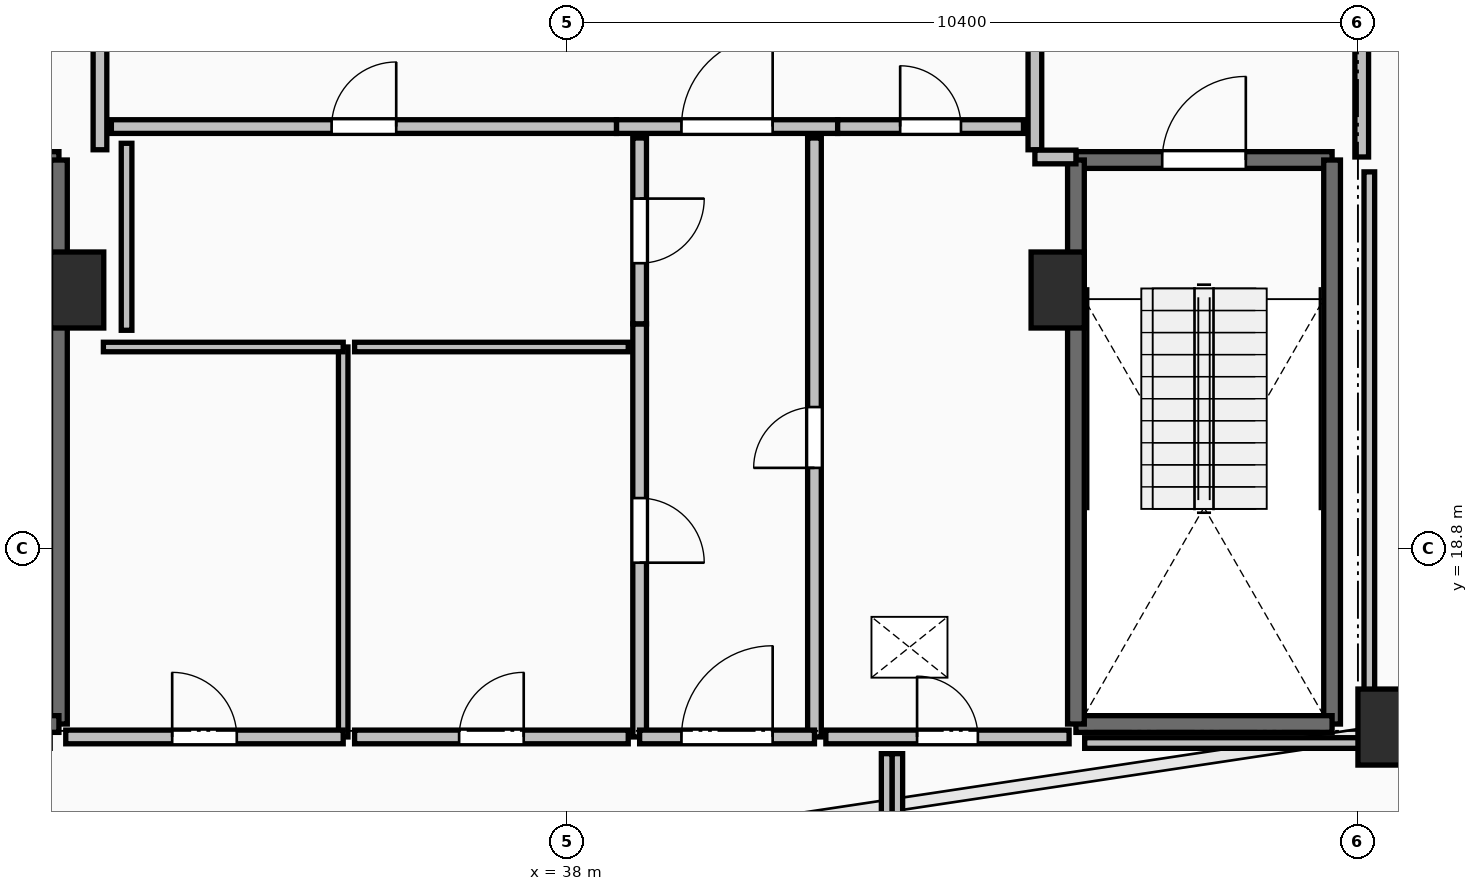
"""IFC4 building model, lengths in metres.
Left out: names, types, materials, properties, quantities, classifications, styles, units other than length and angle.
Written with IfcOpenShell. Run it as: python <this file> out.ifc"""

import sys

from ifc_helpers import new_model, si_unit, direction, frame, frame_2d, origin, origin_2d, place, context, subcontext, project, spatial, rectangle, extrude, element, fill, save


model = new_model("IFC4")
c1 = context("Model", 3, precision=1e-05, world=origin(), true_north=direction((0.0, 1.0)))
c2 = subcontext(c1, "Body", "Model", "MODEL_VIEW")
j1 = project(units=[si_unit("LENGTHUNIT", "METRE"), si_unit("PLANEANGLEUNIT", "RADIAN")], contexts=[c1])
p1 = place(None, origin())
s1 = spatial("IfcSite", under=j1, at=p1, CompositionType="ELEMENT")
p2 = place(p1, origin())
s2 = spatial("IfcBuilding", under=s1, at=p2, CompositionType="ELEMENT")
p3 = place(p2, frame((0.0, 0.0, 234.25)))
s3 = spatial("IfcBuildingStorey", under=s2, at=p3, CompositionType="ELEMENT", Elevation=234.25)
for number, where, z_axis, x_axis in (
    (1, (31.55, 22.2, 0.0), (0.0, 0.0, 1.0), (1.0, 0.0, 0.0)),
    (2, (48.75, 16.45, 0.0), (0.0, 0.0, 1.0), (1.0, 0.0, 0.0)),
    (3, (44.45, 22.2, 0.0), (0.0, 0.0, 1.0), (1.0, 0.0, 0.0)),
):
    element("IfcColumn", number, at=place(p3, frame(where, z_axis=z_axis, x_axis=x_axis)), inside=s3, PredefinedType="PILASTER", context=c2, shape_type="SweptSolid", body=[
        extrude(rectangle(XDim=0.7, YDim=1.0, at=origin_2d()), origin(), (0.0, 0.0, 1.0), 3.55),
    ])
p4 = place(p3, frame((27.94, 23.91, 0.0), z_axis=(0.0, 0.0, 1.0), x_axis=(1.0, 0.0, 0.0)))
e4 = element("IfcWall", 4, at=p4, inside=s3, PredefinedType="SOLIDWALL", context=c2, shape_type="SweptSolid", body=[
    extrude(rectangle(XDim=3.37, YDim=0.22, at=frame_2d((1.685, 0.0))), origin(), (0.0, 0.0, 1.0), 3.29),
])
p5 = place(p4, frame((1.135, 0.0, 0.0)))
e5 = element("IfcOpeningElement", 5, at=p5, cuts=e4, PredefinedType="OPENING", context=c2, shape_type="SweptSolid", body=[
    extrude(rectangle(XDim=1.1, YDim=2.15, at=frame_2d((0.55, 1.075))), frame((0.0, 0.125, 0.0), z_axis=(0.0, -1.0, 0.0), x_axis=(1.0, 0.0, 0.0)), (0.0, 0.0, 1.0), 0.25),
])
p6 = place(p3, frame((31.31, 23.91, 0.0), z_axis=(0.0, 0.0, 1.0), x_axis=(0.0, -1.0, 0.0)))
e6 = element("IfcWall", 6, at=p6, inside=s3, PredefinedType="SOLIDWALL", context=c2, shape_type="SweptSolid", body=[
    extrude(rectangle(XDim=7.42, YDim=0.22, at=frame_2d((3.71, 0.0))), origin(), (0.0, 0.0, 1.0), 3.29),
])
p7 = place(p3, frame((31.31, 16.49, 0.0), z_axis=(0.0, 0.0, 1.0), x_axis=(-1.0, 0.0, 0.0)))
e7 = element("IfcWall", 7, at=p7, inside=s3, PredefinedType="SOLIDWALL", context=c2, shape_type="SweptSolid", body=[
    extrude(rectangle(XDim=3.37, YDim=0.22, at=frame_2d((1.685, 0.0))), origin(), (0.0, 0.0, 1.0), 3.29),
])
p8 = place(p3, frame((44.69, 23.91, 0.0), z_axis=(0.0, 0.0, 1.0), x_axis=(1.0, 0.0, 0.0)))
e8 = element("IfcWall", 8, at=p8, inside=s3, PredefinedType="SOLIDWALL", context=c2, shape_type="SweptSolid", body=[
    extrude(rectangle(XDim=3.37, YDim=0.22, at=frame_2d((1.685, 0.0))), origin(), (0.0, 0.0, 1.0), 3.29),
])
p9 = place(p8, frame((1.135, 0.0, 0.0)))
e9 = element("IfcOpeningElement", 9, at=p9, cuts=e8, PredefinedType="OPENING", context=c2, shape_type="SweptSolid", body=[
    extrude(rectangle(XDim=1.1, YDim=2.15, at=frame_2d((0.55, 1.075))), frame((0.0, 0.125, 0.0), z_axis=(0.0, -1.0, 0.0), x_axis=(1.0, 0.0, 0.0)), (0.0, 0.0, 1.0), 0.25),
])
p10 = place(p3, frame((48.06, 23.91, 0.0), z_axis=(0.0, 0.0, 1.0), x_axis=(0.0, -1.0, 0.0)))
e10 = element("IfcWall", 10, at=p10, inside=s3, PredefinedType="SOLIDWALL", context=c2, shape_type="SweptSolid", body=[
    extrude(rectangle(XDim=7.42, YDim=0.22, at=frame_2d((3.71, 0.0))), origin(), (0.0, 0.0, 1.0), 3.29),
])
p11 = place(p3, frame((48.06, 16.49, 0.0), z_axis=(0.0, 0.0, 1.0), x_axis=(-1.0, 0.0, 0.0)))
e11 = element("IfcWall", 11, at=p11, inside=s3, PredefinedType="SOLIDWALL", context=c2, shape_type="SweptSolid", body=[
    extrude(rectangle(XDim=3.37, YDim=0.22, at=frame_2d((1.685, 0.0))), origin(), (0.0, 0.0, 1.0), 3.29),
])
p12 = place(p3, frame((44.69, 16.49, 0.0), z_axis=(0.0, 0.0, 1.0), x_axis=(0.0, 1.0, 0.0)))
e12 = element("IfcWall", 12, at=p12, inside=s3, PredefinedType="SOLIDWALL", context=c2, shape_type="SweptSolid", body=[
    extrude(rectangle(XDim=7.42, YDim=0.22, at=frame_2d((3.71, 0.0))), origin(), (0.0, 0.0, 1.0), 3.29),
])
p13 = place(p3, frame((31.85, 24.045, 0.0), z_axis=(0.0, 0.0, 1.0), x_axis=(0.0, 1.0, 0.0)))
e13 = element("IfcWall", 13, at=p13, inside=s3, PredefinedType="PARTITIONING", context=c2, shape_type="SweptSolid", body=[
    extrude(rectangle(XDim=3.91, YDim=0.18, at=frame_2d((1.955, 0.0))), origin(), (0.0, 0.0, 1.0), 3.29),
])
p14 = place(p13, frame((1.355, 0.0, 0.0)))
e14 = element("IfcOpeningElement", 14, at=p14, cuts=e13, PredefinedType="OPENING", context=c2, shape_type="SweptSolid", body=[
    extrude(rectangle(XDim=1.2, YDim=2.15, at=frame_2d((0.6, 1.075))), frame((0.0, 0.105, 0.0), z_axis=(0.0, -1.0, 0.0), x_axis=(1.0, 0.0, 0.0)), (0.0, 0.0, 1.0), 0.21),
])
p15 = place(p3, frame((44.15, 27.955, 0.0), z_axis=(0.0, 0.0, 1.0), x_axis=(0.0, -1.0, 0.0)))
e15 = element("IfcWall", 15, at=p15, inside=s3, PredefinedType="PARTITIONING", context=c2, shape_type="SweptSolid", body=[
    extrude(rectangle(XDim=3.91, YDim=0.18, at=frame_2d((1.955, 0.0))), origin(), (0.0, 0.0, 1.0), 3.29),
])
p16 = place(p15, frame((1.355, 0.0, 0.0)))
e16 = element("IfcOpeningElement", 16, at=p16, cuts=e15, PredefinedType="OPENING", context=c2, shape_type="SweptSolid", body=[
    extrude(rectangle(XDim=1.2, YDim=2.15, at=frame_2d((0.6, 1.075))), frame((0.0, 0.105, 0.0), z_axis=(0.0, -1.0, 0.0), x_axis=(1.0, 0.0, 0.0)), (0.0, 0.0, 1.0), 0.21),
])
p17 = place(p3, frame((44.15, 23.95, 0.0), z_axis=(0.0, 0.0, 1.0), x_axis=(1.0, 0.0, 0.0)))
e17 = element("IfcWall", 17, at=p17, inside=s3, PredefinedType="PARTITIONING", context=c2, shape_type="SweptSolid", body=[
    extrude(rectangle(XDim=0.54, YDim=0.18, at=frame_2d((0.27, 0.0))), origin(), (0.0, 0.0, 1.0), 3.29),
])
p18 = place(p3, frame((48.45, 23.95, 0.0), z_axis=(0.0, 0.0, 1.0), x_axis=(0.0, 1.0, 0.0)))
e18 = element("IfcWall", 18, at=p18, inside=s3, PredefinedType="PARTITIONING", context=c2, shape_type="SweptSolid", body=[
    extrude(rectangle(XDim=4.05, YDim=0.18, at=frame_2d((2.025, 0.0))), origin(), (0.0, 0.0, 1.0), 3.29),
])
p19 = place(p18, frame((1.425, 0.0, 0.0)))
e19 = element("IfcOpeningElement", 19, at=p19, cuts=e18, PredefinedType="OPENING", context=c2, shape_type="SweptSolid", body=[
    extrude(rectangle(XDim=1.2, YDim=2.15, at=frame_2d((0.6, 1.075))), frame((0.0, 0.105, 0.0), z_axis=(0.0, -1.0, 0.0), x_axis=(1.0, 0.0, 0.0)), (0.0, 0.0, 1.0), 0.21),
])
p20 = place(p3, frame((38.645, 24.35, 0.0), z_axis=(0.0, 0.0, 1.0), x_axis=(1.0, 0.0, 0.0)))
e20 = element("IfcWall", 20, at=p20, inside=s3, PredefinedType="PARTITIONING", context=c2, shape_type="SweptSolid", body=[
    extrude(rectangle(XDim=2.91, YDim=0.18, at=frame_2d((1.455, 0.0))), origin(), (0.0, 0.0, 1.0), 3.29),
])
p21 = place(p20, frame((0.855, 0.0, 0.0)))
e21 = element("IfcOpeningElement", 21, at=p21, cuts=e20, PredefinedType="OPENING", context=c2, shape_type="SweptSolid", body=[
    extrude(rectangle(XDim=1.2, YDim=2.15, at=frame_2d((0.6, 1.075))), frame((0.0, 0.105, 0.0), z_axis=(0.0, -1.0, 0.0), x_axis=(1.0, 0.0, 0.0)), (0.0, 0.0, 1.0), 0.21),
])
p22 = place(p3, frame((41.555, 24.35, 0.0), z_axis=(0.0, 0.0, 1.0), x_axis=(1.0, 0.0, 0.0)))
e22 = element("IfcWall", 22, at=p22, inside=s3, PredefinedType="PARTITIONING", context=c2, shape_type="SweptSolid", body=[
    extrude(rectangle(XDim=2.445, YDim=0.18, at=frame_2d((1.223, 0.0))), origin(), (0.0, 0.0, 1.0), 3.29),
])
p23 = place(p22, frame((0.823, 0.0, 0.0)))
e23 = element("IfcOpeningElement", 23, at=p23, cuts=e22, PredefinedType="OPENING", context=c2, shape_type="SweptSolid", body=[
    extrude(rectangle(XDim=0.8, YDim=2.05, at=frame_2d((0.4, 1.025))), frame((0.0, 0.105, 0.0), z_axis=(0.0, -1.0, 0.0), x_axis=(1.0, 0.0, 0.0)), (0.0, 0.0, 1.0), 0.21),
])
p24 = place(p3, frame((32.0, 24.35, 0.0), z_axis=(0.0, 0.0, 1.0), x_axis=(1.0, 0.0, 0.0)))
e24 = element("IfcWall", 24, at=p24, inside=s3, PredefinedType="PARTITIONING", context=c2, shape_type="SweptSolid", body=[
    extrude(rectangle(XDim=6.645, YDim=0.18, at=frame_2d((3.323, 0.0))), origin(), (0.0, 0.0, 1.0), 3.29),
])
p25 = place(p24, frame((2.897, 0.0, 0.0)))
e25 = element("IfcOpeningElement", 25, at=p25, cuts=e24, PredefinedType="OPENING", context=c2, shape_type="SweptSolid", body=[
    extrude(rectangle(XDim=0.85, YDim=2.1, at=frame_2d((0.425, 1.05))), frame((0.0, 0.105, 0.0), z_axis=(0.0, -1.0, 0.0), x_axis=(1.0, 0.0, 0.0)), (0.0, 0.0, 1.0), 0.21),
])
p26 = place(p3, frame((41.25, 16.32, 0.0), z_axis=(0.0, 0.0, 1.0), x_axis=(0.0, 1.0, 0.0)))
e26 = element("IfcWall", 26, at=p26, inside=s3, PredefinedType="PARTITIONING", context=c2, shape_type="SweptSolid", body=[
    extrude(rectangle(XDim=7.88, YDim=0.18, at=frame_2d((3.94, 0.0))), origin(), (0.0, 0.0, 1.0), 2.482),
])
p27 = place(p26, frame((3.54, 0.0, 0.0)))
e27 = element("IfcOpeningElement", 27, at=p27, cuts=e26, PredefinedType="OPENING", context=c2, shape_type="SweptSolid", body=[
    extrude(rectangle(XDim=0.8, YDim=2.05, at=frame_2d((0.4, 1.025))), frame((0.0, 0.105, 0.0), z_axis=(0.0, -1.0, 0.0), x_axis=(1.0, 0.0, 0.0)), (0.0, 0.0, 1.0), 0.21),
])
p28 = place(p3, frame((38.95, 21.755, 0.0), z_axis=(0.0, 0.0, 1.0), x_axis=(0.0, -1.0, 0.0)))
e28 = element("IfcWall", 28, at=p28, inside=s3, PredefinedType="PARTITIONING", context=c2, shape_type="SweptSolid", body=[
    extrude(rectangle(XDim=5.435, YDim=0.18, at=frame_2d((2.717, 0.0))), origin(), (0.0, 0.0, 1.0), 3.29),
])
p29 = place(p28, frame((2.292, 0.0, 0.0)))
e29 = element("IfcOpeningElement", 29, at=p29, cuts=e28, PredefinedType="OPENING", context=c2, shape_type="SweptSolid", body=[
    extrude(rectangle(XDim=0.85, YDim=2.1, at=frame_2d((0.425, 1.05))), frame((0.0, 0.105, 0.0), z_axis=(0.0, -1.0, 0.0), x_axis=(1.0, 0.0, 0.0)), (0.0, 0.0, 1.0), 0.21),
])
p30 = place(p3, frame((38.95, 24.2, 0.0), z_axis=(0.0, 0.0, 1.0), x_axis=(0.0, -1.0, 0.0)))
e30 = element("IfcWall", 30, at=p30, inside=s3, PredefinedType="PARTITIONING", context=c2, shape_type="SweptSolid", body=[
    extrude(rectangle(XDim=2.445, YDim=0.18, at=frame_2d((1.223, 0.0))), origin(), (0.0, 0.0, 1.0), 2.482),
])
p31 = place(p30, frame((0.798, 0.0, 0.0)))
e31 = element("IfcOpeningElement", 31, at=p31, cuts=e30, PredefinedType="OPENING", context=c2, shape_type="SweptSolid", body=[
    extrude(rectangle(XDim=0.85, YDim=2.1, at=frame_2d((0.425, 1.05))), frame((0.0, 0.105, 0.0), z_axis=(0.0, -1.0, 0.0), x_axis=(1.0, 0.0, 0.0)), (0.0, 0.0, 1.0), 0.21),
])
p32 = place(p3, frame((38.95, 16.32, 0.0), z_axis=(0.0, 0.0, 1.0), x_axis=(1.0, 0.0, 0.0)))
e32 = element("IfcWall", 32, at=p32, inside=s3, PredefinedType="PARTITIONING", context=c2, shape_type="SweptSolid", body=[
    extrude(rectangle(XDim=2.3, YDim=0.18, at=frame_2d((1.15, 0.0))), origin(), (0.0, 0.0, 1.0), 3.29),
])
p33 = place(p32, frame((0.55, 0.0, 0.0)))
e33 = element("IfcOpeningElement", 33, at=p33, cuts=e32, PredefinedType="OPENING", context=c2, shape_type="SweptSolid", body=[
    extrude(rectangle(XDim=1.2, YDim=2.15, at=frame_2d((0.6, 1.075))), frame((0.0, 0.105, 0.0), z_axis=(0.0, -1.0, 0.0), x_axis=(1.0, 0.0, 0.0)), (0.0, 0.0, 1.0), 0.21),
])
p34 = place(p3, frame((41.4, 16.32, 0.0), z_axis=(0.0, 0.0, 1.0), x_axis=(1.0, 0.0, 0.0)))
e34 = element("IfcWall", 34, at=p34, inside=s3, PredefinedType="PARTITIONING", context=c2, shape_type="SweptSolid", body=[
    extrude(rectangle(XDim=3.2, YDim=0.18, at=frame_2d((1.6, 0.0))), origin(), (0.0, 0.0, 1.0), 3.29),
])
p35 = place(p34, frame((1.2, 0.0, 0.0)))
e35 = element("IfcOpeningElement", 35, at=p35, cuts=e34, PredefinedType="OPENING", context=c2, shape_type="SweptSolid", body=[
    extrude(rectangle(XDim=0.8, YDim=2.05, at=frame_2d((0.4, 1.025))), frame((0.0, 0.105, 0.0), z_axis=(0.0, -1.0, 0.0), x_axis=(1.0, 0.0, 0.0)), (0.0, 0.0, 1.0), 0.21),
])
p36 = place(p3, frame((35.05, 16.32, 0.0), z_axis=(0.0, 0.0, 1.0), x_axis=(0.0, 1.0, 0.0)))
e36 = element("IfcWall", 36, at=p36, inside=s3, PredefinedType="PARTITIONING", context=c2, shape_type="SweptSolid", body=[
    extrude(rectangle(XDim=5.13, YDim=0.125, at=frame_2d((2.565, 0.0))), origin(), (0.0, 0.0, 1.0), 3.29),
])
p37 = place(p3, frame((35.05, 21.45, 0.0), z_axis=(0.0, 0.0, 1.0), x_axis=(-1.0, 0.0, 0.0)))
e37 = element("IfcWall", 37, at=p37, inside=s3, PredefinedType="PARTITIONING", context=c2, shape_type="SweptSolid", body=[
    extrude(rectangle(XDim=3.155, YDim=0.125, at=frame_2d((1.578, 0.0))), origin(), (0.0, 0.0, 1.0), 3.29),
])
p38 = place(p3, frame((31.4, 16.32, 0.0), z_axis=(0.0, 0.0, 1.0), x_axis=(1.0, 0.0, 0.0)))
e38 = element("IfcWall", 38, at=p38, inside=s3, PredefinedType="PARTITIONING", context=c2, shape_type="SweptSolid", body=[
    extrude(rectangle(XDim=3.65, YDim=0.18, at=frame_2d((1.825, 0.0))), origin(), (0.0, 0.0, 1.0), 3.29),
])
p39 = place(p38, frame((1.4, 0.0, 0.0)))
e39 = element("IfcOpeningElement", 39, at=p39, cuts=e38, PredefinedType="OPENING", context=c2, shape_type="SweptSolid", body=[
    extrude(rectangle(XDim=0.85, YDim=2.1, at=frame_2d((0.425, 1.05))), frame((0.0, 0.105, 0.0), z_axis=(0.0, -1.0, 0.0), x_axis=(1.0, 0.0, 0.0)), (0.0, 0.0, 1.0), 0.21),
])
p40 = place(p3, frame((38.8, 21.45, 0.0), z_axis=(0.0, 0.0, 1.0), x_axis=(-1.0, 0.0, 0.0)))
e40 = element("IfcWall", 40, at=p40, inside=s3, PredefinedType="PARTITIONING", context=c2, shape_type="SweptSolid", body=[
    extrude(rectangle(XDim=3.6, YDim=0.125, at=frame_2d((1.8, 0.0))), origin(), (0.0, 0.0, 1.0), 3.29),
])
p41 = place(p3, frame((35.2, 16.32, 0.0), z_axis=(0.0, 0.0, 1.0), x_axis=(1.0, 0.0, 0.0)))
e41 = element("IfcWall", 41, at=p41, inside=s3, PredefinedType="PARTITIONING", context=c2, shape_type="SweptSolid", body=[
    extrude(rectangle(XDim=3.6, YDim=0.18, at=frame_2d((1.8, 0.0))), origin(), (0.0, 0.0, 1.0), 3.29),
])
p42 = place(p41, frame((1.375, 0.0, 0.0)))
e42 = element("IfcOpeningElement", 42, at=p42, cuts=e41, PredefinedType="OPENING", context=c2, shape_type="SweptSolid", body=[
    extrude(rectangle(XDim=0.85, YDim=2.1, at=frame_2d((0.425, 1.05))), frame((0.0, 0.105, 0.0), z_axis=(0.0, -1.0, 0.0), x_axis=(1.0, 0.0, 0.0)), (0.0, 0.0, 1.0), 0.21),
])
p43 = place(p3, frame((32.2, 24.13, 0.0), z_axis=(0.0, 0.0, 1.0), x_axis=(0.0, -1.0, 0.0)))
e43 = element("IfcWall", 43, at=p43, inside=s3, PredefinedType="PARTITIONING", context=c2, shape_type="SweptSolid", body=[
    extrude(rectangle(XDim=2.46, YDim=0.14, at=frame_2d((1.23, 0.0))), origin(), (0.0, 0.0, 1.0), 2.482),
])
p44 = place(p3, frame((42.34, 14.27, 0.0), z_axis=(0.0, 0.0, 1.0), x_axis=(0.0, 1.0, 0.0)))
e44 = element("IfcWall", 44, at=p44, inside=s3, PredefinedType="PARTITIONING", context=c2, shape_type="SweptSolid", body=[
    extrude(rectangle(XDim=1.83, YDim=0.14, at=frame_2d((0.915, 0.0))), origin(), (0.0, 0.0, 1.0), 3.29),
])
p45 = place(p3, frame((44.805, 16.24, 0.0), z_axis=(0.0, 0.0, 1.0), x_axis=(1.0, 0.0, 0.0)))
e45 = element("IfcWall", 45, at=p45, inside=s3, PredefinedType="PARTITIONING", context=c2, shape_type="SweptSolid", body=[
    extrude(rectangle(XDim=3.745, YDim=0.14, at=frame_2d((1.873, 0.0))), origin(), (0.0, 0.0, 1.0), 2.482),
])
p46 = place(p3, frame((48.55, 16.24, 0.0), z_axis=(0.0, 0.0, 1.0), x_axis=(0.0, 1.0, 0.0)))
e46 = element("IfcWall", 46, at=p46, inside=s3, PredefinedType="PARTITIONING", context=c2, shape_type="SweptSolid", body=[
    extrude(rectangle(XDim=7.514, YDim=0.14, at=frame_2d((3.757, 0.0))), origin(), (0.0, 0.0, 1.0), 2.482),
])
p47 = place(p3, frame((42.2, 16.1, 0.0), z_axis=(0.0, 0.0, 1.0), x_axis=(0.0, -1.0, 0.0)))
e47 = element("IfcWall", 47, at=p47, inside=s3, PredefinedType="PARTITIONING", context=c2, shape_type="SweptSolid", body=[
    extrude(rectangle(XDim=1.83, YDim=0.14, at=frame_2d((0.915, 0.0))), origin(), (0.0, 0.0, 1.0), 3.29),
])
p48 = place(p9, origin())
e48 = element("IfcDoor", 48, at=p48, inside=s3, OperationType="SINGLE_SWING_RIGHT", PredefinedType="DOOR", context=c2, shape_type="SweptSolid", body=[
    extrude(rectangle(XDim=1.1, YDim=2.15, at=frame_2d((0.55, 1.075))), frame((0.0, 0.025, 0.0), z_axis=(0.0, -1.0, 0.0), x_axis=(1.0, 0.0, 0.0)), (0.0, 0.0, 1.0), 0.05),
])
fill(e9, e48)
p49 = place(p21, origin())
e49 = element("IfcDoor", 49, at=p49, inside=s3, OperationType="SINGLE_SWING_RIGHT", PredefinedType="DOOR", context=c2, shape_type="SweptSolid", body=[
    extrude(rectangle(XDim=1.2, YDim=2.15, at=frame_2d((0.6, 1.075))), frame((0.0, 0.025, 0.0), z_axis=(0.0, -1.0, 0.0), x_axis=(1.0, 0.0, 0.0)), (0.0, 0.0, 1.0), 0.05),
])
fill(e21, e49)
p50 = place(p23, origin())
e50 = element("IfcDoor", 50, at=p50, inside=s3, OperationType="SINGLE_SWING_LEFT", PredefinedType="DOOR", context=c2, shape_type="SweptSolid", body=[
    extrude(rectangle(XDim=0.8, YDim=2.05, at=frame_2d((0.4, 1.025))), frame((0.0, 0.025, 0.0), z_axis=(0.0, -1.0, 0.0), x_axis=(1.0, 0.0, 0.0)), (0.0, 0.0, 1.0), 0.05),
])
fill(e23, e50)
p51 = place(p25, origin())
e51 = element("IfcDoor", 51, at=p51, inside=s3, OperationType="SINGLE_SWING_RIGHT", PredefinedType="DOOR", context=c2, shape_type="SweptSolid", body=[
    extrude(rectangle(XDim=0.85, YDim=2.1, at=frame_2d((0.425, 1.05))), frame((0.0, 0.025, 0.0), z_axis=(0.0, -1.0, 0.0), x_axis=(1.0, 0.0, 0.0)), (0.0, 0.0, 1.0), 0.05),
])
fill(e25, e51)
p52 = place(p27, origin())
e52 = element("IfcDoor", 52, at=p52, inside=s3, OperationType="SINGLE_SWING_LEFT", PredefinedType="DOOR", context=c2, shape_type="SweptSolid", body=[
    extrude(rectangle(XDim=0.8, YDim=2.05, at=frame_2d((0.4, 1.025))), frame((0.0, 0.025, 0.0), z_axis=(0.0, -1.0, 0.0), x_axis=(1.0, 0.0, 0.0)), (0.0, 0.0, 1.0), 0.05),
])
fill(e27, e52)
p53 = place(p29, origin())
e53 = element("IfcDoor", 53, at=p53, inside=s3, OperationType="SINGLE_SWING_RIGHT", PredefinedType="DOOR", context=c2, shape_type="SweptSolid", body=[
    extrude(rectangle(XDim=0.85, YDim=2.1, at=frame_2d((0.425, 1.05))), frame((0.0, 0.025, 0.0), z_axis=(0.0, -1.0, 0.0), x_axis=(1.0, 0.0, 0.0)), (0.0, 0.0, 1.0), 0.05),
])
fill(e29, e53)
p54 = place(p31, origin())
e54 = element("IfcDoor", 54, at=p54, inside=s3, OperationType="SINGLE_SWING_LEFT", PredefinedType="DOOR", context=c2, shape_type="SweptSolid", body=[
    extrude(rectangle(XDim=0.85, YDim=2.1, at=frame_2d((0.425, 1.05))), frame((0.0, 0.025, 0.0), z_axis=(0.0, -1.0, 0.0), x_axis=(1.0, 0.0, 0.0)), (0.0, 0.0, 1.0), 0.05),
])
fill(e31, e54)
p55 = place(p33, origin())
e55 = element("IfcDoor", 55, at=p55, inside=s3, OperationType="SINGLE_SWING_RIGHT", PredefinedType="DOOR", context=c2, shape_type="SweptSolid", body=[
    extrude(rectangle(XDim=1.2, YDim=2.15, at=frame_2d((0.6, 1.075))), frame((0.0, 0.025, 0.0), z_axis=(0.0, -1.0, 0.0), x_axis=(1.0, 0.0, 0.0)), (0.0, 0.0, 1.0), 0.05),
])
fill(e33, e55)
p56 = place(p35, origin())
e56 = element("IfcDoor", 56, at=p56, inside=s3, OperationType="SINGLE_SWING_LEFT", PredefinedType="DOOR", context=c2, shape_type="SweptSolid", body=[
    extrude(rectangle(XDim=0.8, YDim=2.05, at=frame_2d((0.4, 1.025))), frame((0.0, 0.025, 0.0), z_axis=(0.0, -1.0, 0.0), x_axis=(1.0, 0.0, 0.0)), (0.0, 0.0, 1.0), 0.05),
])
fill(e35, e56)
p57 = place(p39, origin())
e57 = element("IfcDoor", 57, at=p57, inside=s3, OperationType="SINGLE_SWING_LEFT", PredefinedType="DOOR", context=c2, shape_type="SweptSolid", body=[
    extrude(rectangle(XDim=0.85, YDim=2.1, at=frame_2d((0.425, 1.05))), frame((0.0, 0.025, 0.0), z_axis=(0.0, -1.0, 0.0), x_axis=(1.0, 0.0, 0.0)), (0.0, 0.0, 1.0), 0.05),
])
fill(e39, e57)
p58 = place(p42, origin())
e58 = element("IfcDoor", 58, at=p58, inside=s3, OperationType="SINGLE_SWING_RIGHT", PredefinedType="DOOR", context=c2, shape_type="SweptSolid", body=[
    extrude(rectangle(XDim=0.85, YDim=2.1, at=frame_2d((0.425, 1.05))), frame((0.0, 0.025, 0.0), z_axis=(0.0, -1.0, 0.0), x_axis=(1.0, 0.0, 0.0)), (0.0, 0.0, 1.0), 0.05),
])
fill(e42, e58)
save(model, sys.argv[1])
